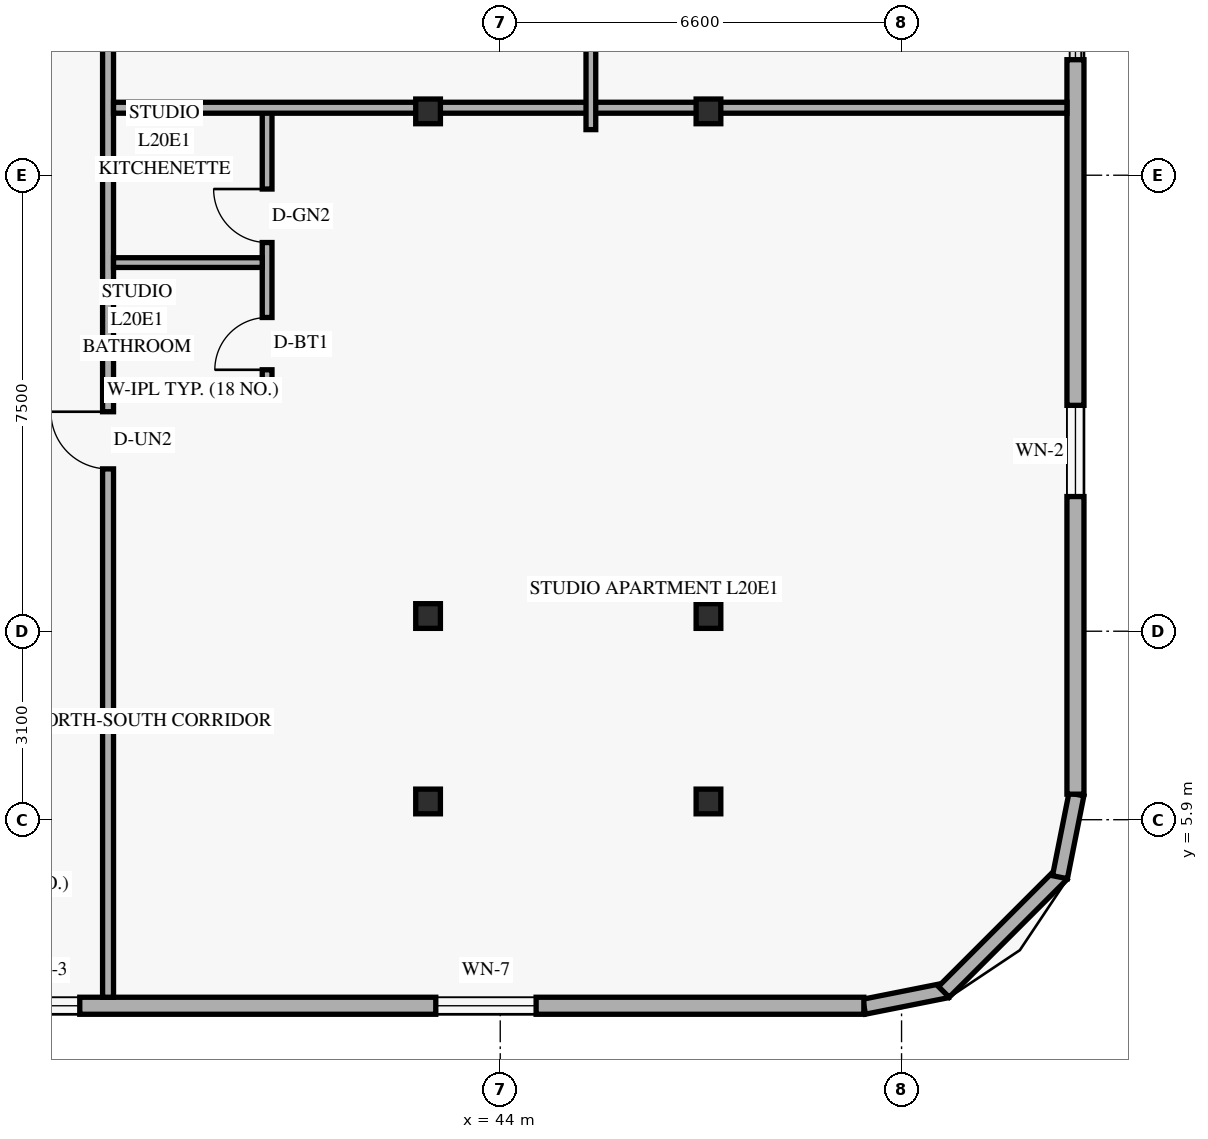
"""IFC4 building model, lengths in metres.
Left out: names, types, materials, properties, quantities, classifications, styles, units other than length and angle.
Written with IfcOpenShell. Run it as: python <this file> out.ifc"""

import sys

from ifc_helpers import new_model, si_unit, direction, frame, frame_2d, origin, origin_2d, place, context, subcontext, project, spatial, rectangle, hollow_rectangle, extrude, element, fill, save


model = new_model("IFC4")
c1 = context("Model", 3, precision=1e-05, world=origin(), true_north=direction((0.0, 1.0)))
c2 = subcontext(c1, "Body", "Model", "MODEL_VIEW")
j1 = project(units=[si_unit("LENGTHUNIT", "METRE"), si_unit("PLANEANGLEUNIT", "RADIAN")], contexts=[c1])
p1 = place(None, origin())
s1 = spatial("IfcSite", under=j1, at=p1, CompositionType="ELEMENT")
p2 = place(p1, origin())
s2 = spatial("IfcBuilding", under=s1, at=p2, CompositionType="ELEMENT")
p3 = place(p2, frame((0.0, 0.0, 80.4)))
s3 = spatial("IfcBuildingStorey", under=s2, at=p3, CompositionType="ELEMENT", Elevation=80.4)
for number, where, z_axis, x_axis in (
    (1, (42.75, 6.2, 0.0), (0.035, 0.0, 0.999), (0.0, 1.0, 0.0)),
    (2, (42.75, 9.25, 0.0), (0.035, 0.0, 0.999), (0.0, 1.0, 0.0)),
    (3, (42.75, 17.55, 0.0), (0.035, 0.0, 0.999), (0.0, 1.0, 0.0)),
):
    element("IfcColumn", number, at=place(p3, frame(where, z_axis=z_axis, x_axis=x_axis)), inside=s3, PredefinedType="COLUMN", context=c2, shape_type="SweptSolid", body=[
        extrude(hollow_rectangle(XDim=0.406, YDim=0.406, WallThickness=0.016, at=origin_2d()), origin(), (0.0, 0.0, 1.0), 3.602),
    ])
for number, where, z_axis, x_axis in (
    (4, (47.32, 6.2, 0.0), (0.058, 0.0, 0.998), (0.0, 1.0, 0.0)),
    (5, (47.32, 9.25, 0.0), (0.058, 0.0, 0.998), (0.0, 1.0, 0.0)),
    (6, (47.32, 17.55, 0.0), (0.058, 0.0, 0.998), (0.0, 1.0, 0.0)),
):
    element("IfcColumn", number, at=place(p3, frame(where, z_axis=z_axis, x_axis=x_axis)), inside=s3, PredefinedType="COLUMN", context=c2, shape_type="SweptSolid", body=[
        extrude(hollow_rectangle(XDim=0.406, YDim=0.406, WallThickness=0.016, at=origin_2d()), origin(), (0.0, 0.0, 1.0), 3.606),
    ])
p4 = place(p3, frame((49.983, 2.824, 0.0), z_axis=(0.0, 0.0, 1.0), x_axis=(0.980809899341, 0.19496651342, 0.0)))
e7 = element("IfcWall", 7, at=p4, inside=s3, PredefinedType="SOLIDWALL", context=c2, shape_type="SweptSolid", body=[
    extrude(rectangle(XDim=1.389, YDim=0.25, at=frame_2d((0.694, 0.0))), origin(), (0.0, 0.0, 1.0), 3.36),
])
p5 = place(p3, frame((51.295, 3.068, 0.0), z_axis=(0.0, 0.0, 1.0), x_axis=(0.707151344399, 0.707062215165, 0.0)))
e8 = element("IfcWall", 8, at=p5, inside=s3, PredefinedType="SOLIDWALL", context=c2, shape_type="SweptSolid", body=[
    extrude(rectangle(XDim=2.739, YDim=0.25, at=frame_2d((1.37, 0.0))), origin(), (0.0, 0.0, 1.0), 3.36),
])
p6 = place(p3, frame((53.205, 4.955, 0.0), z_axis=(0.0, 0.0, 1.0), x_axis=(0.195000137217, 0.980803214965, 0.0)))
e9 = element("IfcWall", 9, at=p6, inside=s3, PredefinedType="SOLIDWALL", context=c2, shape_type="SweptSolid", body=[
    extrude(rectangle(XDim=1.388, YDim=0.25, at=frame_2d((0.694, 0.0))), origin(), (0.0, 0.0, 1.0), 3.36),
])
p7 = place(p3, frame((13.42, 2.84, 0.0), z_axis=(0.0, 0.0, 1.0), x_axis=(1.0, 0.0, 0.0)))
e10 = element("IfcWall", 10, at=p7, inside=s3, PredefinedType="SOLIDWALL", context=c2, shape_type="SweptSolid", body=[
    extrude(rectangle(XDim=36.56, YDim=0.28, at=frame_2d((18.28, 0.0))), origin(), (0.0, 0.0, 1.0), 3.36),
])
p8 = place(p7, frame((3.29, 0.0, 0.85)))
e11 = element("IfcOpeningElement", 11, at=p8, cuts=e10, PredefinedType="OPENING", context=c2, shape_type="SweptSolid", body=[
    extrude(rectangle(XDim=1.65, YDim=1.6, at=frame_2d((0.825, 0.8))), frame((0.0, 0.15, 0.0), z_axis=(0.0, -1.0, 0.0), x_axis=(1.0, 0.0, 0.0)), (0.0, 0.0, 1.0), 0.3),
])
p9 = place(p7, frame((8.68, 0.0, 0.85)))
e12 = element("IfcOpeningElement", 12, at=p9, cuts=e10, PredefinedType="OPENING", context=c2, shape_type="SweptSolid", body=[
    extrude(rectangle(XDim=1.2, YDim=1.5, at=frame_2d((0.6, 0.75))), frame((0.0, 0.15, 0.0), z_axis=(0.0, -1.0, 0.0), x_axis=(1.0, 0.0, 0.0)), (0.0, 0.0, 1.0), 0.3),
])
p10 = place(p7, frame((11.956, 0.0, 0.85)))
e13 = element("IfcOpeningElement", 13, at=p10, cuts=e10, PredefinedType="OPENING", context=c2, shape_type="SweptSolid", body=[
    extrude(rectangle(XDim=1.65, YDim=1.6, at=frame_2d((0.825, 0.8))), frame((0.0, 0.15, 0.0), z_axis=(0.0, -1.0, 0.0), x_axis=(1.0, 0.0, 0.0)), (0.0, 0.0, 1.0), 0.3),
])
p11 = place(p7, frame((17.791, 0.0, 0.85)))
e14 = element("IfcOpeningElement", 14, at=p11, cuts=e10, PredefinedType="OPENING", context=c2, shape_type="SweptSolid", body=[
    extrude(rectangle(XDim=1.65, YDim=1.6, at=frame_2d((0.825, 0.8))), frame((0.0, 0.15, 0.0), z_axis=(0.0, -1.0, 0.0), x_axis=(1.0, 0.0, 0.0)), (0.0, 0.0, 1.0), 0.3),
])
p12 = place(p7, frame((22.465, 0.0, 0.85)))
e15 = element("IfcOpeningElement", 15, at=p12, cuts=e10, PredefinedType="OPENING", context=c2, shape_type="SweptSolid", body=[
    extrude(rectangle(XDim=1.2, YDim=1.5, at=frame_2d((0.6, 0.75))), frame((0.0, 0.15, 0.0), z_axis=(0.0, -1.0, 0.0), x_axis=(1.0, 0.0, 0.0)), (0.0, 0.0, 1.0), 0.3),
])
p13 = place(p7, frame((29.52, 0.0, 0.85)))
e16 = element("IfcOpeningElement", 16, at=p13, cuts=e10, PredefinedType="OPENING", context=c2, shape_type="SweptSolid", body=[
    extrude(rectangle(XDim=1.65, YDim=1.6, at=frame_2d((0.825, 0.8))), frame((0.0, 0.15, 0.0), z_axis=(0.0, -1.0, 0.0), x_axis=(1.0, 0.0, 0.0)), (0.0, 0.0, 1.0), 0.3),
])
p14 = place(p3, frame((53.46, 6.32, 0.0), z_axis=(0.0, 0.0, 1.0), x_axis=(0.0, 1.0, 0.0)))
e17 = element("IfcWall", 17, at=p14, inside=s3, PredefinedType="SOLIDWALL", context=c2, shape_type="SweptSolid", body=[
    extrude(rectangle(XDim=12.08, YDim=0.28, at=frame_2d((6.04, 0.0))), origin(), (0.0, 0.0, 1.0), 3.36),
])
p15 = place(p14, frame((4.895, 0.0, 0.85)))
e18 = element("IfcOpeningElement", 18, at=p15, cuts=e17, PredefinedType="OPENING", context=c2, shape_type="SweptSolid", body=[
    extrude(rectangle(XDim=1.5, YDim=1.55, at=frame_2d((0.75, 0.775))), frame((0.0, 0.15, 0.0), z_axis=(0.0, -1.0, 0.0), x_axis=(1.0, 0.0, 0.0)), (0.0, 0.0, 1.0), 0.3),
])
p16 = place(p3, frame((37.55, 2.98, 0.0), z_axis=(0.0, 0.0, 1.0), x_axis=(0.0, 1.0, 0.0)))
e19 = element("IfcWall", 19, at=p16, inside=s3, PredefinedType="STANDARD", context=c2, shape_type="SweptSolid", body=[
    extrude(rectangle(XDim=42.04, YDim=0.18, at=frame_2d((21.02, 0.0))), origin(), (0.0, 0.0, 1.0), 2.731),
])
p17 = place(p16, frame((8.69, 0.0, 0.0)))
e20 = element("IfcOpeningElement", 20, at=p17, cuts=e19, PredefinedType="OPENING", context=c2, shape_type="SweptSolid", body=[
    extrude(rectangle(XDim=0.94, YDim=2.15, at=frame_2d((0.47, 1.075))), frame((0.0, 0.1, 0.0), z_axis=(0.0, -1.0, 0.0), x_axis=(1.0, 0.0, 0.0)), (0.0, 0.0, 1.0), 0.2),
])
p18 = place(p16, frame((19.043, 0.0, 0.0)))
e21 = element("IfcOpeningElement", 21, at=p18, cuts=e19, PredefinedType="OPENING", context=c2, shape_type="SweptSolid", body=[
    extrude(rectangle(XDim=0.94, YDim=2.15, at=frame_2d((0.47, 1.075))), frame((0.0, 0.1, 0.0), z_axis=(0.0, -1.0, 0.0), x_axis=(1.0, 0.0, 0.0)), (0.0, 0.0, 1.0), 0.2),
])
p19 = place(p16, frame((32.145, 0.0, 0.0)))
e22 = element("IfcOpeningElement", 22, at=p19, cuts=e19, PredefinedType="OPENING", context=c2, shape_type="SweptSolid", body=[
    extrude(rectangle(XDim=0.94, YDim=2.15, at=frame_2d((0.47, 1.075))), frame((0.0, 0.1, 0.0), z_axis=(0.0, -1.0, 0.0), x_axis=(1.0, 0.0, 0.0)), (0.0, 0.0, 1.0), 0.2),
])
p20 = place(p3, frame((37.64, 12.97, 0.0), z_axis=(0.0, 0.0, 1.0), x_axis=(1.0, 0.0, 0.0)))
e23 = element("IfcWall", 23, at=p20, inside=s3, PredefinedType="PLUMBINGWALL", context=c2, shape_type="SweptSolid", body=[
    extrude(rectangle(XDim=2.606, YDim=0.16, at=frame_2d((1.303, 0.0))), origin(), (0.0, 0.0, 1.0), 3.36),
])
p21 = place(p3, frame((40.166, 12.88, 0.0), z_axis=(0.0, 0.0, 1.0), x_axis=(0.0, 1.0, 0.0)))
e24 = element("IfcWall", 24, at=p21, inside=s3, PredefinedType="PLUMBINGWALL", context=c2, shape_type="SweptSolid", body=[
    extrude(rectangle(XDim=4.73, YDim=0.16, at=frame_2d((2.365, 0.0))), origin(), (0.0, 0.0, 1.0), 2.731),
])
p22 = place(p21, frame((0.42, 0.0, 0.0)))
e25 = element("IfcOpeningElement", 25, at=p22, cuts=e24, PredefinedType="OPENING", context=c2, shape_type="SweptSolid", body=[
    extrude(rectangle(XDim=0.86, YDim=2.12, at=frame_2d((0.43, 1.06))), frame((0.0, 0.09, 0.0), z_axis=(0.0, -1.0, 0.0), x_axis=(1.0, 0.0, 0.0)), (0.0, 0.0, 1.0), 0.18),
])
p23 = place(p21, frame((2.513, 0.0, 0.0)))
e26 = element("IfcOpeningElement", 26, at=p23, cuts=e24, PredefinedType="OPENING", context=c2, shape_type="SweptSolid", body=[
    extrude(rectangle(XDim=0.88, YDim=2.12, at=frame_2d((0.44, 1.06))), frame((0.0, 0.09, 0.0), z_axis=(0.0, -1.0, 0.0), x_axis=(1.0, 0.0, 0.0)), (0.0, 0.0, 1.0), 0.18),
])
p24 = place(p3, frame((37.64, 15.063, 0.0), z_axis=(0.0, 0.0, 1.0), x_axis=(1.0, 0.0, 0.0)))
e27 = element("IfcWall", 27, at=p24, inside=s3, PredefinedType="PLUMBINGWALL", context=c2, shape_type="SweptSolid", body=[
    extrude(rectangle(XDim=2.446, YDim=0.16, at=frame_2d((1.223, 0.0))), origin(), (0.0, 0.0, 1.0), 3.36),
])
p25 = place(p3, frame((37.64, 17.61, 0.0), z_axis=(0.0, 0.0, 1.0), x_axis=(1.0, 0.0, 0.0)))
e28 = element("IfcWall", 28, at=p25, inside=s3, PredefinedType="PARTITIONING", context=c2, shape_type="SweptSolid", body=[
    extrude(rectangle(XDim=15.68, YDim=0.18, at=frame_2d((7.84, 0.0))), origin(), (0.0, 0.0, 1.0), 2.731),
])
p26 = place(p3, frame((45.49, 17.25, 0.0), z_axis=(0.0, 0.0, 1.0), x_axis=(0.0, 1.0, 0.0)))
e29 = element("IfcWall", 29, at=p26, inside=s3, PredefinedType="PARTITIONING", context=c2, shape_type="SweptSolid", body=[
    extrude(rectangle(XDim=10.86, YDim=0.16, at=frame_2d((5.43, 0.0))), origin(), (0.0, 0.0, 1.0), 2.731),
])
p27 = place(p26, frame((4.67, 0.0, 0.0)))
e30 = element("IfcOpeningElement", 30, at=p27, cuts=e29, PredefinedType="OPENING", context=c2, shape_type="SweptSolid", body=[
    extrude(rectangle(XDim=0.95, YDim=2.15, at=frame_2d((0.475, 1.075))), frame((0.0, 0.09, 0.0), z_axis=(0.0, -1.0, 0.0), x_axis=(1.0, 0.0, 0.0)), (0.0, 0.0, 1.0), 0.18),
])
p28 = place(p12, origin())
e31 = element("IfcWindow", 31, at=p28, inside=s3, PartitioningType="SINGLE_PANEL", PredefinedType="WINDOW", context=c2, shape_type="SweptSolid", body=[
    extrude(rectangle(XDim=1.2, YDim=1.5, at=frame_2d((0.6, 0.75))), frame((0.0, 0.03, 0.0), z_axis=(0.0, -1.0, 0.0), x_axis=(1.0, 0.0, 0.0)), (0.0, 0.0, 1.0), 0.06),
])
fill(e15, e31)
p29 = place(p13, origin())
e32 = element("IfcWindow", 32, at=p29, inside=s3, PartitioningType="SINGLE_PANEL", PredefinedType="WINDOW", context=c2, shape_type="SweptSolid", body=[
    extrude(rectangle(XDim=1.65, YDim=1.6, at=frame_2d((0.825, 0.8))), frame((0.0, 0.03, 0.0), z_axis=(0.0, -1.0, 0.0), x_axis=(1.0, 0.0, 0.0)), (0.0, 0.0, 1.0), 0.06),
])
fill(e16, e32)
p30 = place(p15, origin())
e33 = element("IfcWindow", 33, at=p30, inside=s3, PartitioningType="SINGLE_PANEL", PredefinedType="WINDOW", context=c2, shape_type="SweptSolid", body=[
    extrude(rectangle(XDim=1.5, YDim=1.55, at=frame_2d((0.75, 0.775))), frame((0.0, 0.03, 0.0), z_axis=(0.0, -1.0, 0.0), x_axis=(1.0, 0.0, 0.0)), (0.0, 0.0, 1.0), 0.06),
])
fill(e18, e33)
p31 = place(p17, origin())
e34 = element("IfcDoor", 34, at=p31, inside=s3, OperationType="SINGLE_SWING_RIGHT", PredefinedType="DOOR", context=c2, shape_type="SweptSolid", body=[
    extrude(rectangle(XDim=0.94, YDim=2.15, at=frame_2d((0.47, 1.075))), frame((0.0, 0.025, 0.0), z_axis=(0.0, -1.0, 0.0), x_axis=(1.0, 0.0, 0.0)), (0.0, 0.0, 1.0), 0.05),
])
fill(e20, e34)
p32 = place(p22, origin())
e35 = element("IfcDoor", 35, at=p32, inside=s3, OperationType="SINGLE_SWING_LEFT", PredefinedType="DOOR", context=c2, shape_type="SweptSolid", body=[
    extrude(rectangle(XDim=0.86, YDim=2.12, at=frame_2d((0.43, 1.06))), frame((0.0, 0.025, 0.0), z_axis=(0.0, -1.0, 0.0), x_axis=(1.0, 0.0, 0.0)), (0.0, 0.0, 1.0), 0.05),
])
fill(e25, e35)
p33 = place(p23, origin())
e36 = element("IfcDoor", 36, at=p33, inside=s3, OperationType="SINGLE_SWING_RIGHT", PredefinedType="DOOR", context=c2, shape_type="SweptSolid", body=[
    extrude(rectangle(XDim=0.88, YDim=2.12, at=frame_2d((0.44, 1.06))), frame((0.0, 0.025, 0.0), z_axis=(0.0, -1.0, 0.0), x_axis=(1.0, 0.0, 0.0)), (0.0, 0.0, 1.0), 0.05),
])
fill(e26, e36)
save(model, sys.argv[1])
